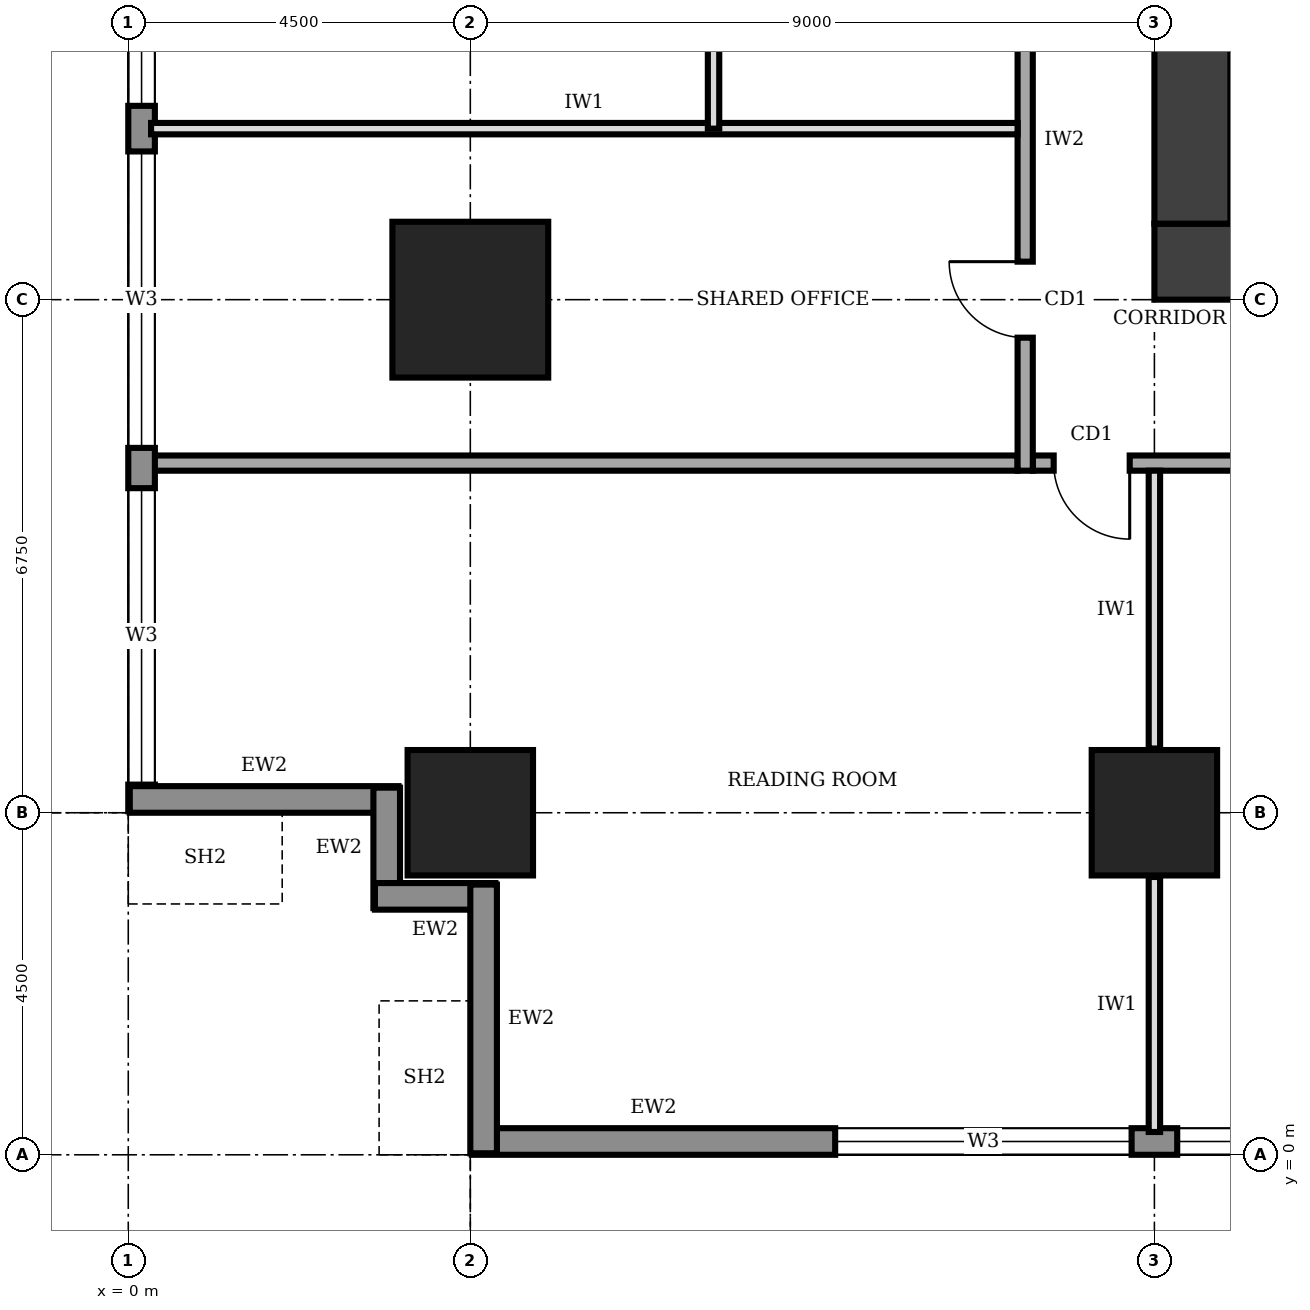
"""IFC4 building model, lengths in metres.
Left out: names, types, materials, properties, quantities, classifications, styles, units other than length and angle.
Written with IfcOpenShell. Run it as: python <this file> out.ifc"""

import sys

from ifc_helpers import new_model, si_unit, direction, frame, frame_2d, origin, origin_2d, place, context, subcontext, project, spatial, rectangle, extrude, element, fill, save


model = new_model("IFC4")
c1 = context("Model", 3, precision=1e-05, world=origin(), true_north=direction((0.0, 1.0)))
c2 = subcontext(c1, "Body", "Model", "MODEL_VIEW")
j1 = project(units=[si_unit("LENGTHUNIT", "METRE"), si_unit("PLANEANGLEUNIT", "RADIAN")], contexts=[c1])
p1 = place(None, origin())
s1 = spatial("IfcSite", under=j1, at=p1, CompositionType="ELEMENT")
p2 = place(p1, origin())
s2 = spatial("IfcBuilding", under=s1, at=p2, CompositionType="ELEMENT")
p3 = place(p2, frame((0.0, 0.0, 201.0)))
s3 = spatial("IfcBuildingStorey", under=s2, at=p3, CompositionType="ELEMENT", Elevation=201.0)
p4 = place(p3, frame((13.5, 11.75, 0.0), z_axis=(0.0, 0.0, 1.0), x_axis=(1.0, 0.0, 0.0)))
e1 = element("IfcWall", 1, at=p4, inside=s3, PredefinedType="SHEAR", context=c2, shape_type="SweptSolid", body=[
    extrude(rectangle(XDim=13.5, YDim=1.0, at=frame_2d((6.75, 0.0))), origin(), (0.0, 0.0, 1.0), 4.0),
])
p5 = place(p4, frame((4.75, 0.0, 0.0)))
e2 = element("IfcOpeningElement", 2, at=p5, cuts=e1, PredefinedType="OPENING", context=c2, shape_type="SweptSolid", body=[
    extrude(rectangle(XDim=1.0, YDim=2.1, at=frame_2d((0.5, 1.05))), frame((0.0, 0.51, 0.0), z_axis=(0.0, -1.0, 0.0), x_axis=(1.0, 0.0, 0.0)), (0.0, 0.0, 1.0), 1.02),
])
p6 = place(p3, frame((14.0, 28.25, 0.0), z_axis=(0.0, 0.0, 1.0), x_axis=(0.0, -1.0, 0.0)))
e3 = element("IfcWall", 3, at=p6, inside=s3, PredefinedType="SHEAR", context=c2, shape_type="SweptSolid", body=[
    extrude(rectangle(XDim=16.0, YDim=1.0, at=frame_2d((8.0, 0.0))), origin(), (0.0, 0.0, 1.0), 4.0),
])
for number, where, z_axis, x_axis in (
    (4, (4.5, 4.5, 0.0), (0.0, 0.0, 1.0), (1.0, 0.0, 0.0)),
    (5, (13.5, 4.5, 0.0), (0.0, 0.0, 1.0), (1.0, 0.0, 0.0)),
):
    element("IfcColumn", number, at=place(p3, frame(where, z_axis=z_axis, x_axis=x_axis)), inside=s3, PredefinedType="COLUMN", context=c2, shape_type="SweptSolid", body=[
        extrude(rectangle(XDim=1.65, YDim=1.65, at=origin_2d()), origin(), (0.0, 0.0, 1.0), 4.0),
    ])
p7 = place(p3, frame((4.5, 11.25, 0.0), z_axis=(0.0, 0.0, 1.0), x_axis=(1.0, 0.0, 0.0)))
e6 = element("IfcColumn", 6, at=p7, inside=s3, PredefinedType="COLUMN", context=c2, shape_type="SweptSolid", body=[
    extrude(rectangle(XDim=2.05, YDim=2.05, at=origin_2d()), origin(), (0.0, 0.0, 1.0), 4.0),
])
p8 = place(p3, frame((4.52, 0.175, 0.0), z_axis=(0.0, 0.0, 1.0), x_axis=(1.0, 0.0, 0.0)))
e7 = element("IfcWall", 7, at=p8, inside=s3, PredefinedType="STANDARD", context=c2, shape_type="SweptSolid", body=[
    extrude(rectangle(XDim=31.46, YDim=0.35, at=frame_2d((15.73, 0.0))), origin(), (0.0, 0.0, 1.0), 3.75),
])
p9 = place(p8, frame((4.78, 0.0, 0.95)))
e8 = element("IfcOpeningElement", 8, at=p9, cuts=e7, PredefinedType="OPENING", context=c2, shape_type="SweptSolid", body=[
    extrude(rectangle(XDim=3.9, YDim=1.8, at=frame_2d((1.95, 0.9))), frame((0.0, 0.185, 0.0), z_axis=(0.0, -1.0, 0.0), x_axis=(1.0, 0.0, 0.0)), (0.0, 0.0, 1.0), 0.37),
])
p10 = place(p8, frame((9.28, 0.0, 0.95)))
e9 = element("IfcOpeningElement", 9, at=p10, cuts=e7, PredefinedType="OPENING", context=c2, shape_type="SweptSolid", body=[
    extrude(rectangle(XDim=3.9, YDim=1.8, at=frame_2d((1.95, 0.9))), frame((0.0, 0.185, 0.0), z_axis=(0.0, -1.0, 0.0), x_axis=(1.0, 0.0, 0.0)), (0.0, 0.0, 1.0), 0.37),
])
p11 = place(p8, frame((13.78, 0.0, 0.95)))
e10 = element("IfcOpeningElement", 10, at=p11, cuts=e7, PredefinedType="OPENING", context=c2, shape_type="SweptSolid", body=[
    extrude(rectangle(XDim=3.9, YDim=1.8, at=frame_2d((1.95, 0.9))), frame((0.0, 0.185, 0.0), z_axis=(0.0, -1.0, 0.0), x_axis=(1.0, 0.0, 0.0)), (0.0, 0.0, 1.0), 0.37),
])
p12 = place(p8, frame((18.28, 0.0, 0.95)))
e11 = element("IfcOpeningElement", 11, at=p12, cuts=e7, PredefinedType="OPENING", context=c2, shape_type="SweptSolid", body=[
    extrude(rectangle(XDim=3.9, YDim=1.8, at=frame_2d((1.95, 0.9))), frame((0.0, 0.185, 0.0), z_axis=(0.0, -1.0, 0.0), x_axis=(1.0, 0.0, 0.0)), (0.0, 0.0, 1.0), 0.37),
])
p13 = place(p8, frame((22.78, 0.0, 0.95)))
e12 = element("IfcOpeningElement", 12, at=p13, cuts=e7, PredefinedType="OPENING", context=c2, shape_type="SweptSolid", body=[
    extrude(rectangle(XDim=3.9, YDim=1.8, at=frame_2d((1.95, 0.9))), frame((0.0, 0.185, 0.0), z_axis=(0.0, -1.0, 0.0), x_axis=(1.0, 0.0, 0.0)), (0.0, 0.0, 1.0), 0.37),
])
p14 = place(p8, frame((27.21, 0.0, 0.95)))
e13 = element("IfcOpeningElement", 13, at=p14, cuts=e7, PredefinedType="OPENING", context=c2, shape_type="SweptSolid", body=[
    extrude(rectangle(XDim=3.9, YDim=1.8, at=frame_2d((1.95, 0.9))), frame((0.0, 0.185, 0.0), z_axis=(0.0, -1.0, 0.0), x_axis=(1.0, 0.0, 0.0)), (0.0, 0.0, 1.0), 0.37),
])
p15 = place(p3, frame((0.175, 35.98, 0.0), z_axis=(0.0, 0.0, 1.0), x_axis=(0.0, -1.0, 0.0)))
e14 = element("IfcWall", 14, at=p15, inside=s3, PredefinedType="STANDARD", context=c2, shape_type="SweptSolid", body=[
    extrude(rectangle(XDim=31.46, YDim=0.35, at=frame_2d((15.73, 0.0))), origin(), (0.0, 0.0, 1.0), 3.75),
])
p16 = place(p15, frame((27.21, 0.0, 0.95)))
e15 = element("IfcOpeningElement", 15, at=p16, cuts=e14, PredefinedType="OPENING", context=c2, shape_type="SweptSolid", body=[
    extrude(rectangle(XDim=3.9, YDim=1.8, at=frame_2d((1.95, 0.9))), frame((0.0, 0.185, 0.0), z_axis=(0.0, -1.0, 0.0), x_axis=(1.0, 0.0, 0.0)), (0.0, 0.0, 1.0), 0.37),
])
p17 = place(p15, frame((22.78, 0.0, 0.95)))
e16 = element("IfcOpeningElement", 16, at=p17, cuts=e14, PredefinedType="OPENING", context=c2, shape_type="SweptSolid", body=[
    extrude(rectangle(XDim=3.9, YDim=1.8, at=frame_2d((1.95, 0.9))), frame((0.0, 0.185, 0.0), z_axis=(0.0, -1.0, 0.0), x_axis=(1.0, 0.0, 0.0)), (0.0, 0.0, 1.0), 0.37),
])
p18 = place(p15, frame((18.28, 0.0, 0.95)))
e17 = element("IfcOpeningElement", 17, at=p18, cuts=e14, PredefinedType="OPENING", context=c2, shape_type="SweptSolid", body=[
    extrude(rectangle(XDim=3.9, YDim=1.8, at=frame_2d((1.95, 0.9))), frame((0.0, 0.185, 0.0), z_axis=(0.0, -1.0, 0.0), x_axis=(1.0, 0.0, 0.0)), (0.0, 0.0, 1.0), 0.37),
])
p19 = place(p15, frame((13.78, 0.0, 0.95)))
e18 = element("IfcOpeningElement", 18, at=p19, cuts=e14, PredefinedType="OPENING", context=c2, shape_type="SweptSolid", body=[
    extrude(rectangle(XDim=3.9, YDim=1.8, at=frame_2d((1.95, 0.9))), frame((0.0, 0.185, 0.0), z_axis=(0.0, -1.0, 0.0), x_axis=(1.0, 0.0, 0.0)), (0.0, 0.0, 1.0), 0.37),
])
p20 = place(p15, frame((9.28, 0.0, 0.95)))
e19 = element("IfcOpeningElement", 19, at=p20, cuts=e14, PredefinedType="OPENING", context=c2, shape_type="SweptSolid", body=[
    extrude(rectangle(XDim=3.9, YDim=1.8, at=frame_2d((1.95, 0.9))), frame((0.0, 0.185, 0.0), z_axis=(0.0, -1.0, 0.0), x_axis=(1.0, 0.0, 0.0)), (0.0, 0.0, 1.0), 0.37),
])
p21 = place(p15, frame((4.78, 0.0, 0.95)))
e20 = element("IfcOpeningElement", 20, at=p21, cuts=e14, PredefinedType="OPENING", context=c2, shape_type="SweptSolid", body=[
    extrude(rectangle(XDim=3.9, YDim=1.8, at=frame_2d((1.95, 0.9))), frame((0.0, 0.185, 0.0), z_axis=(0.0, -1.0, 0.0), x_axis=(1.0, 0.0, 0.0)), (0.0, 0.0, 1.0), 0.37),
])
p22 = place(p3, frame((0.02, 4.675, 0.0), z_axis=(0.0, 0.0, 1.0), x_axis=(1.0, 0.0, 0.0)))
e21 = element("IfcWall", 21, at=p22, inside=s3, PredefinedType="STANDARD", context=c2, shape_type="SweptSolid", body=[
    extrude(rectangle(XDim=3.535, YDim=0.35, at=frame_2d((1.768, 0.0))), origin(), (0.0, 0.0, 1.0), 2.85),
])
for number, where, z_axis, x_axis in (
    (22, (3.4, 4.83, 0.0), (0.0, 0.0, 1.0), (0.0, -1.0, 0.0)),
    (23, (3.245, 3.4, 0.0), (0.0, 0.0, 1.0), (1.0, 0.0, 0.0)),
):
    element("IfcWall", number, at=place(p3, frame(where, z_axis=z_axis, x_axis=x_axis)), inside=s3, PredefinedType="STANDARD", context=c2, shape_type="SweptSolid", body=[
        extrude(rectangle(XDim=1.585, YDim=0.35, at=frame_2d((0.792, 0.0))), origin(), (0.0, 0.0, 1.0), 3.75),
    ])
p23 = place(p3, frame((4.675, 3.555, 0.0), z_axis=(0.0, 0.0, 1.0), x_axis=(0.0, -1.0, 0.0)))
e24 = element("IfcWall", 24, at=p23, inside=s3, PredefinedType="STANDARD", context=c2, shape_type="SweptSolid", body=[
    extrude(rectangle(XDim=3.535, YDim=0.35, at=frame_2d((1.768, 0.0))), origin(), (0.0, 0.0, 1.0), 2.85),
])
p24 = place(p3, frame((11.9, 9.1, 0.0), z_axis=(0.0, 0.0, 1.0), x_axis=(1.0, 0.0, 0.0)))
e25 = element("IfcWall", 25, at=p24, inside=s3, PredefinedType="SOLIDWALL", context=c2, shape_type="SweptSolid", body=[
    extrude(rectangle(XDim=16.9, YDim=0.2, at=frame_2d((8.45, 0.0))), origin(), (0.0, 0.0, 1.0), 3.75),
])
p25 = place(p24, frame((0.275, 0.0, 0.0)))
e26 = element("IfcOpeningElement", 26, at=p25, cuts=e25, PredefinedType="OPENING", context=c2, shape_type="SweptSolid", body=[
    extrude(rectangle(XDim=1.0, YDim=2.1, at=frame_2d((0.5, 1.05))), frame((0.0, 0.11, 0.0), z_axis=(0.0, -1.0, 0.0), x_axis=(1.0, 0.0, 0.0)), (0.0, 0.0, 1.0), 0.22),
])
p26 = place(p3, frame((11.8, 32.8, 0.0), z_axis=(0.0, 0.0, 1.0), x_axis=(0.0, -1.0, 0.0)))
e27 = element("IfcWall", 27, at=p26, inside=s3, PredefinedType="SOLIDWALL", context=c2, shape_type="SweptSolid", body=[
    extrude(rectangle(XDim=23.8, YDim=0.2, at=frame_2d((11.9, 0.0))), origin(), (0.0, 0.0, 1.0), 3.75),
])
p27 = place(p26, frame((21.05, 0.0, 0.0)))
e28 = element("IfcOpeningElement", 28, at=p27, cuts=e27, PredefinedType="OPENING", context=c2, shape_type="SweptSolid", body=[
    extrude(rectangle(XDim=1.0, YDim=2.1, at=frame_2d((0.5, 1.05))), frame((0.0, 0.11, 0.0), z_axis=(0.0, -1.0, 0.0), x_axis=(1.0, 0.0, 0.0)), (0.0, 0.0, 1.0), 0.22),
])
p28 = place(p26, frame((16.95, 0.0, 0.0)))
e29 = element("IfcOpeningElement", 29, at=p28, cuts=e27, PredefinedType="OPENING", context=c2, shape_type="SweptSolid", body=[
    extrude(rectangle(XDim=0.9, YDim=2.1, at=frame_2d((0.45, 1.05))), frame((0.0, 0.11, 0.0), z_axis=(0.0, -1.0, 0.0), x_axis=(1.0, 0.0, 0.0)), (0.0, 0.0, 1.0), 0.22),
])
p29 = place(p26, frame((13.95, 0.0, 0.0)))
e30 = element("IfcOpeningElement", 30, at=p29, cuts=e27, PredefinedType="OPENING", context=c2, shape_type="SweptSolid", body=[
    extrude(rectangle(XDim=0.9, YDim=2.1, at=frame_2d((0.45, 1.05))), frame((0.0, 0.11, 0.0), z_axis=(0.0, -1.0, 0.0), x_axis=(1.0, 0.0, 0.0)), (0.0, 0.0, 1.0), 0.22),
])
p30 = place(p26, frame((9.1, 0.0, 0.0)))
e31 = element("IfcOpeningElement", 31, at=p30, cuts=e27, PredefinedType="OPENING", context=c2, shape_type="SweptSolid", body=[
    extrude(rectangle(XDim=0.9, YDim=2.1, at=frame_2d((0.45, 1.05))), frame((0.0, 0.11, 0.0), z_axis=(0.0, -1.0, 0.0), x_axis=(1.0, 0.0, 0.0)), (0.0, 0.0, 1.0), 0.22),
])
p31 = place(p26, frame((6.3, 0.0, 0.0)))
e32 = element("IfcOpeningElement", 32, at=p31, cuts=e27, PredefinedType="OPENING", context=c2, shape_type="SweptSolid", body=[
    extrude(rectangle(XDim=1.0, YDim=2.1, at=frame_2d((0.5, 1.05))), frame((0.0, 0.11, 0.0), z_axis=(0.0, -1.0, 0.0), x_axis=(1.0, 0.0, 0.0)), (0.0, 0.0, 1.0), 0.22),
])
p32 = place(p26, frame((11.8, 0.0, 0.0)))
e33 = element("IfcOpeningElement", 33, at=p32, cuts=e27, PredefinedType="OPENING", context=c2, shape_type="SweptSolid", body=[
    extrude(rectangle(XDim=1.0, YDim=2.1, at=frame_2d((0.5, 1.05))), frame((0.0, 0.11, 0.0), z_axis=(0.0, -1.0, 0.0), x_axis=(1.0, 0.0, 0.0)), (0.0, 0.0, 1.0), 0.22),
])
p33 = place(p26, frame((2.3, 0.0, 0.0)))
e34 = element("IfcOpeningElement", 34, at=p33, cuts=e27, PredefinedType="OPENING", context=c2, shape_type="SweptSolid", body=[
    extrude(rectangle(XDim=1.0, YDim=2.1, at=frame_2d((0.5, 1.05))), frame((0.0, 0.11, 0.0), z_axis=(0.0, -1.0, 0.0), x_axis=(1.0, 0.0, 0.0)), (0.0, 0.0, 1.0), 0.22),
])
p34 = place(p3, frame((0.3, 9.1, 0.0), z_axis=(0.0, 0.0, 1.0), x_axis=(1.0, 0.0, 0.0)))
e35 = element("IfcWall", 35, at=p34, inside=s3, PredefinedType="SOLIDWALL", context=c2, shape_type="SweptSolid", body=[
    extrude(rectangle(XDim=11.4, YDim=0.2, at=frame_2d((5.7, 0.0))), origin(), (0.0, 0.0, 1.0), 3.75),
])
p35 = place(p3, frame((13.5, 0.3, 0.0), z_axis=(0.0, 0.0, 1.0), x_axis=(0.0, 1.0, 0.0)))
e36 = element("IfcWall", 36, at=p35, inside=s3, PredefinedType="PARTITIONING", context=c2, shape_type="SweptSolid", body=[
    extrude(rectangle(XDim=3.355, YDim=0.15, at=frame_2d((1.677, 0.0))), origin(), (0.0, 0.0, 1.0), 2.85),
])
p36 = place(p3, frame((13.5, 5.345, 0.0), z_axis=(0.0, 0.0, 1.0), x_axis=(0.0, 1.0, 0.0)))
e37 = element("IfcWall", 37, at=p36, inside=s3, PredefinedType="PARTITIONING", context=c2, shape_type="SweptSolid", body=[
    extrude(rectangle(XDim=3.655, YDim=0.15, at=frame_2d((1.828, 0.0))), origin(), (0.0, 0.0, 1.0), 2.85),
])
p37 = place(p3, frame((0.3, 13.5, 0.0), z_axis=(0.0, 0.0, 1.0), x_axis=(1.0, 0.0, 0.0)))
e38 = element("IfcWall", 38, at=p37, inside=s3, PredefinedType="PARTITIONING", context=c2, shape_type="SweptSolid", body=[
    extrude(rectangle(XDim=11.4, YDim=0.15, at=frame_2d((5.7, 0.0))), origin(), (0.0, 0.0, 1.0), 3.75),
])
p38 = place(p3, frame((7.7, 13.5, 0.0), z_axis=(0.0, 0.0, 1.0), x_axis=(0.0, 1.0, 0.0)))
e39 = element("IfcWall", 39, at=p38, inside=s3, PredefinedType="PARTITIONING", context=c2, shape_type="SweptSolid", body=[
    extrude(rectangle(XDim=3.8, YDim=0.15, at=frame_2d((1.9, 0.0))), origin(), (0.0, 0.0, 1.0), 3.75),
])
p39 = place(p9, origin())
e40 = element("IfcWindow", 40, at=p39, inside=s3, PartitioningType="SINGLE_PANEL", PredefinedType="WINDOW", context=c2, shape_type="SweptSolid", body=[
    extrude(rectangle(XDim=3.9, YDim=1.8, at=frame_2d((1.95, 0.9))), frame((0.0, 0.03, 0.0), z_axis=(0.0, -1.0, 0.0), x_axis=(1.0, 0.0, 0.0)), (0.0, 0.0, 1.0), 0.06),
])
fill(e8, e40)
p40 = place(p10, origin())
e41 = element("IfcWindow", 41, at=p40, inside=s3, PartitioningType="SINGLE_PANEL", PredefinedType="WINDOW", context=c2, shape_type="SweptSolid", body=[
    extrude(rectangle(XDim=3.9, YDim=1.8, at=frame_2d((1.95, 0.9))), frame((0.0, 0.03, 0.0), z_axis=(0.0, -1.0, 0.0), x_axis=(1.0, 0.0, 0.0)), (0.0, 0.0, 1.0), 0.06),
])
fill(e9, e41)
p41 = place(p16, origin())
e42 = element("IfcWindow", 42, at=p41, inside=s3, PartitioningType="SINGLE_PANEL", PredefinedType="WINDOW", context=c2, shape_type="SweptSolid", body=[
    extrude(rectangle(XDim=3.9, YDim=1.8, at=frame_2d((1.95, 0.9))), frame((0.0, 0.03, 0.0), z_axis=(0.0, -1.0, 0.0), x_axis=(1.0, 0.0, 0.0)), (0.0, 0.0, 1.0), 0.06),
])
fill(e15, e42)
p42 = place(p17, origin())
e43 = element("IfcWindow", 43, at=p42, inside=s3, PartitioningType="SINGLE_PANEL", PredefinedType="WINDOW", context=c2, shape_type="SweptSolid", body=[
    extrude(rectangle(XDim=3.9, YDim=1.8, at=frame_2d((1.95, 0.9))), frame((0.0, 0.03, 0.0), z_axis=(0.0, -1.0, 0.0), x_axis=(1.0, 0.0, 0.0)), (0.0, 0.0, 1.0), 0.06),
])
fill(e16, e43)
p43 = place(p18, origin())
e44 = element("IfcWindow", 44, at=p43, inside=s3, PartitioningType="SINGLE_PANEL", PredefinedType="WINDOW", context=c2, shape_type="SweptSolid", body=[
    extrude(rectangle(XDim=3.9, YDim=1.8, at=frame_2d((1.95, 0.9))), frame((0.0, 0.03, 0.0), z_axis=(0.0, -1.0, 0.0), x_axis=(1.0, 0.0, 0.0)), (0.0, 0.0, 1.0), 0.06),
])
fill(e17, e44)
p44 = place(p25, frame((1.0, 0.0, 0.0), z_axis=(0.0, 0.0, 1.0), x_axis=(-1.0, 0.0, 0.0)))
e45 = element("IfcDoor", 45, at=p44, inside=s3, OperationType="SINGLE_SWING_LEFT", PredefinedType="DOOR", context=c2, shape_type="SweptSolid", body=[
    extrude(rectangle(XDim=1.0, YDim=2.1, at=frame_2d((0.5, 1.05))), frame((0.0, 0.025, 0.0), z_axis=(0.0, -1.0, 0.0), x_axis=(1.0, 0.0, 0.0)), (0.0, 0.0, 1.0), 0.05),
])
fill(e26, e45)
p45 = place(p27, frame((1.0, 0.0, 0.0), z_axis=(0.0, 0.0, 1.0), x_axis=(-1.0, 0.0, 0.0)))
e46 = element("IfcDoor", 46, at=p45, inside=s3, OperationType="SINGLE_SWING_RIGHT", PredefinedType="DOOR", context=c2, shape_type="SweptSolid", body=[
    extrude(rectangle(XDim=1.0, YDim=2.1, at=frame_2d((0.5, 1.05))), frame((0.0, 0.025, 0.0), z_axis=(0.0, -1.0, 0.0), x_axis=(1.0, 0.0, 0.0)), (0.0, 0.0, 1.0), 0.05),
])
fill(e28, e46)
save(model, sys.argv[1])
